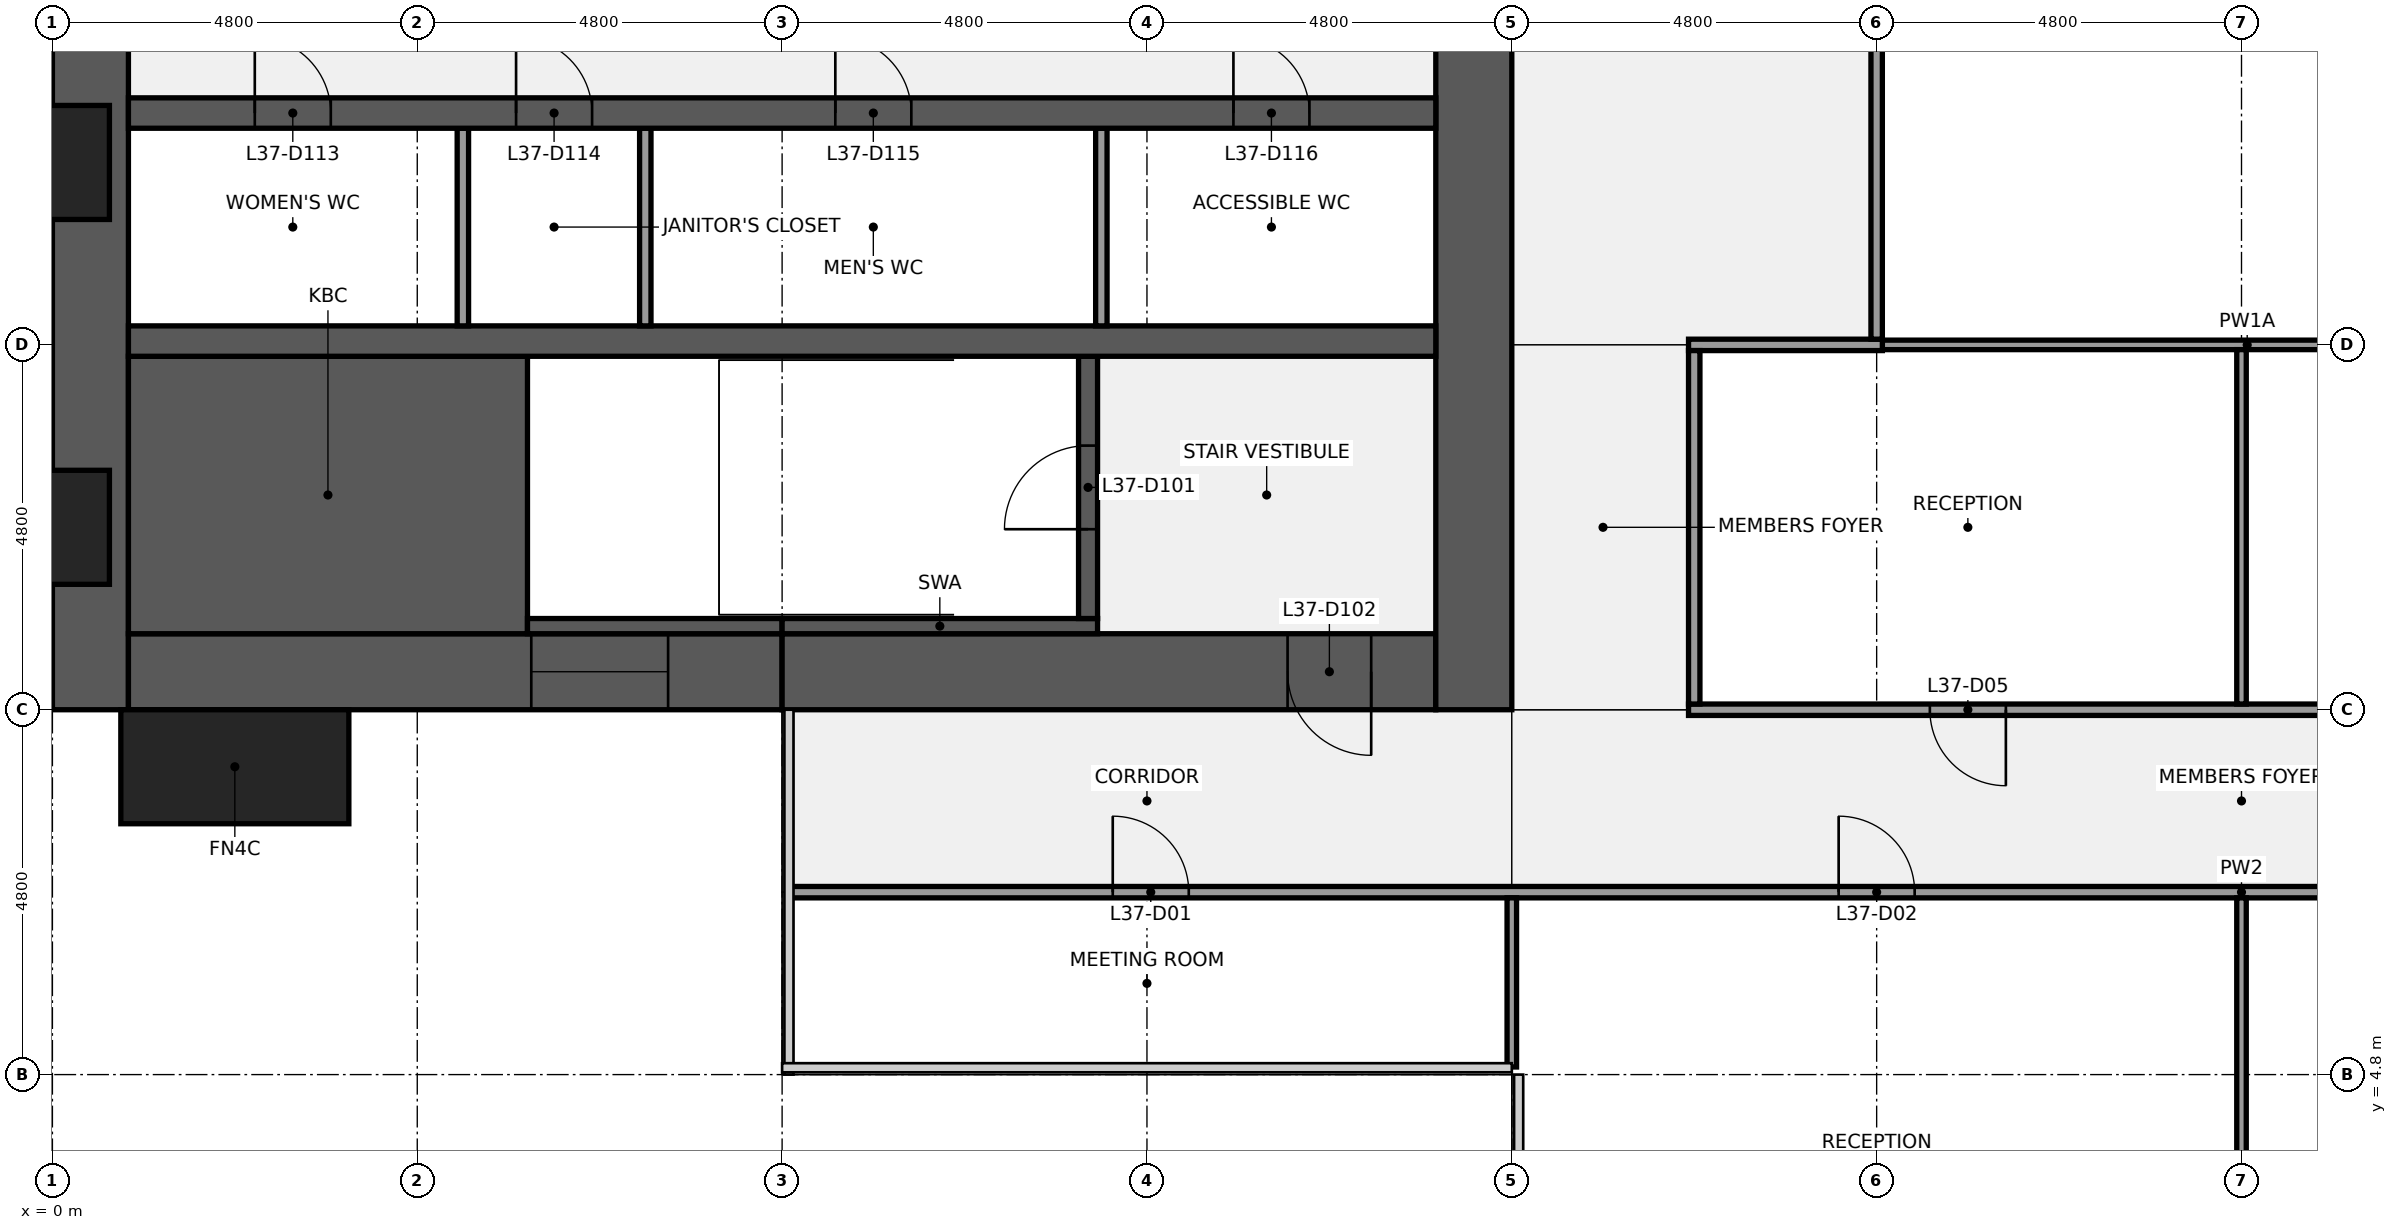
"""IFC4 building model, lengths in metres.
Left out: names, types, materials, properties, quantities, classifications, styles, units other than length and angle.
Written with IfcOpenShell. Run it as: python <this file> out.ifc"""

import sys

from ifc_helpers import new_model, si_unit, direction, frame, frame_2d, origin, origin_2d, place, context, subcontext, project, spatial, rectangle, extrude, element, fill, save


model = new_model("IFC4")
c1 = context("Model", 3, precision=1e-05, world=origin(), true_north=direction((0.0, 1.0)))
c2 = subcontext(c1, "Body", "Model", "MODEL_VIEW")
j1 = project(units=[si_unit("LENGTHUNIT", "METRE"), si_unit("PLANEANGLEUNIT", "RADIAN")], contexts=[c1])
p1 = place(None, origin())
s1 = spatial("IfcSite", under=j1, at=p1, CompositionType="ELEMENT")
p2 = place(p1, origin())
s2 = spatial("IfcBuilding", under=s1, at=p2, CompositionType="ELEMENT")
p3 = place(p2, frame((0.0, 0.0, 168.1)))
s3 = spatial("IfcBuildingStorey", under=s2, at=p3, CompositionType="ELEMENT", Elevation=168.1)
p4 = place(p3, frame((0.5, 9.6, 0.0), z_axis=(0.0, 0.0, 1.0), x_axis=(0.0, 1.0, 0.0)))
e1 = element("IfcWall", 1, at=p4, inside=s3, PredefinedType="SHEAR", context=c2, shape_type="SweptSolid", body=[
    extrude(rectangle(XDim=28.8, YDim=1.0, at=frame_2d((14.4, 0.0))), origin(), (0.0, 0.0, 1.0), 3.84),
])
p5 = place(p4, frame((8.85, 0.0, 0.9)))
e2 = element("IfcOpeningElement", 2, at=p5, cuts=e1, PredefinedType="OPENING", context=c2, shape_type="SweptSolid", body=[
    extrude(rectangle(XDim=1.5, YDim=1.5, at=frame_2d((0.75, 0.75))), frame((0.0, 0.51, 0.0), z_axis=(0.0, -1.0, 0.0), x_axis=(1.0, 0.0, 0.0)), (0.0, 0.0, 1.0), 1.02),
])
p6 = place(p4, frame((18.45, 0.0, 0.9)))
e3 = element("IfcOpeningElement", 3, at=p6, cuts=e1, PredefinedType="OPENING", context=c2, shape_type="SweptSolid", body=[
    extrude(rectangle(XDim=1.5, YDim=1.5, at=frame_2d((0.75, 0.75))), frame((0.0, 0.51, 0.0), z_axis=(0.0, -1.0, 0.0), x_axis=(1.0, 0.0, 0.0)), (0.0, 0.0, 1.0), 1.02),
])
p7 = place(p3, frame((9.6, 10.1, 0.0), z_axis=(0.0, 0.0, 1.0), x_axis=(-1.0, 0.0, 0.0)))
e4 = element("IfcWall", 4, at=p7, inside=s3, PredefinedType="SHEAR", context=c2, shape_type="SweptSolid", body=[
    extrude(rectangle(XDim=8.6, YDim=1.0, at=frame_2d((4.3, 0.0))), origin(), (0.0, 0.0, 1.0), 3.84),
])
p8 = place(p7, frame((1.5, 0.0, 0.9)))
e5 = element("IfcOpeningElement", 5, at=p8, cuts=e4, PredefinedType="OPENING", context=c2, shape_type="SweptSolid", body=[
    extrude(rectangle(XDim=1.8, YDim=1.5, at=frame_2d((0.9, 0.75))), frame((0.0, 0.51, 0.0), z_axis=(0.0, -1.0, 0.0), x_axis=(1.0, 0.0, 0.0)), (0.0, 0.0, 1.0), 1.02),
])
p9 = place(p3, frame((18.2, 10.1, 0.0), z_axis=(0.0, 0.0, 1.0), x_axis=(-1.0, 0.0, 0.0)))
e6 = element("IfcWall", 6, at=p9, inside=s3, PredefinedType="SHEAR", context=c2, shape_type="SweptSolid", body=[
    extrude(rectangle(XDim=8.6, YDim=1.0, at=frame_2d((4.3, 0.0))), origin(), (0.0, 0.0, 1.0), 3.84),
])
p10 = place(p9, frame((0.85, 0.0, 0.0)))
e7 = element("IfcOpeningElement", 7, at=p10, cuts=e6, PredefinedType="OPENING", context=c2, shape_type="SweptSolid", body=[
    extrude(rectangle(XDim=1.1, YDim=2.1, at=frame_2d((0.55, 1.05))), frame((0.0, 0.51, 0.0), z_axis=(0.0, -1.0, 0.0), x_axis=(1.0, 0.0, 0.0)), (0.0, 0.0, 1.0), 1.02),
])
p11 = place(p3, frame((18.7, 38.4, 0.0), z_axis=(0.0, 0.0, 1.0), x_axis=(0.0, -1.0, 0.0)))
e8 = element("IfcWall", 8, at=p11, inside=s3, PredefinedType="SHEAR", context=c2, shape_type="SweptSolid", body=[
    extrude(rectangle(XDim=28.8, YDim=1.0, at=frame_2d((14.4, 0.0))), origin(), (0.0, 0.0, 1.0), 3.84),
])
p12 = place(p11, frame((18.3, 0.0, 0.0)))
e9 = element("IfcOpeningElement", 9, at=p12, cuts=e8, PredefinedType="OPENING", context=c2, shape_type="SweptSolid", body=[
    extrude(rectangle(XDim=1.8, YDim=2.1, at=frame_2d((0.9, 1.05))), frame((0.0, 0.51, 0.0), z_axis=(0.0, -1.0, 0.0), x_axis=(1.0, 0.0, 0.0)), (0.0, 0.0, 1.0), 1.02),
])
p13 = place(p11, frame((8.7, 0.0, 0.0)))
e10 = element("IfcOpeningElement", 10, at=p13, cuts=e8, PredefinedType="OPENING", context=c2, shape_type="SweptSolid", body=[
    extrude(rectangle(XDim=1.8, YDim=2.1, at=frame_2d((0.9, 1.05))), frame((0.0, 0.51, 0.0), z_axis=(0.0, -1.0, 0.0), x_axis=(1.0, 0.0, 0.0)), (0.0, 0.0, 1.0), 1.02),
])
p14 = place(p3, frame((1.0, 12.425, 0.0), z_axis=(0.0, 0.0, 1.0), x_axis=(1.0, 0.0, 0.0)))
e11 = element("IfcWall", 11, at=p14, inside=s3, PredefinedType="SHEAR", context=c2, shape_type="SweptSolid", body=[
    extrude(rectangle(XDim=5.25, YDim=3.65, at=frame_2d((2.625, 0.0))), origin(), (0.0, 0.0, 1.0), 3.84),
])
p15 = place(p3, frame((6.25, 10.7, 0.0), z_axis=(0.0, 0.0, 1.0), x_axis=(1.0, 0.0, 0.0)))
e12 = element("IfcWall", 12, at=p15, inside=s3, PredefinedType="SHEAR", context=c2, shape_type="SweptSolid", body=[
    extrude(rectangle(XDim=3.35, YDim=0.2, at=frame_2d((1.675, 0.0))), origin(), (0.0, 0.0, 1.0), 3.84),
])
p16 = place(p3, frame((9.6, 10.7, 0.0), z_axis=(0.0, 0.0, 1.0), x_axis=(1.0, 0.0, 0.0)))
e13 = element("IfcWall", 13, at=p16, inside=s3, PredefinedType="SHEAR", context=c2, shape_type="SweptSolid", body=[
    extrude(rectangle(XDim=4.15, YDim=0.2, at=frame_2d((2.075, 0.0))), origin(), (0.0, 0.0, 1.0), 3.84),
])
p17 = place(p3, frame((13.625, 10.8, 0.0), z_axis=(0.0, 0.0, 1.0), x_axis=(0.0, 1.0, 0.0)))
e14 = element("IfcWall", 14, at=p17, inside=s3, PredefinedType="SHEAR", context=c2, shape_type="SweptSolid", body=[
    extrude(rectangle(XDim=3.45, YDim=0.25, at=frame_2d((1.725, 0.0))), origin(), (0.0, 0.0, 1.0), 3.84),
])
p18 = place(p17, frame((1.175, 0.0, 0.0)))
e15 = element("IfcOpeningElement", 15, at=p18, cuts=e14, PredefinedType="OPENING", context=c2, shape_type="SweptSolid", body=[
    extrude(rectangle(XDim=1.1, YDim=2.1, at=frame_2d((0.55, 1.05))), frame((0.0, 0.135, 0.0), z_axis=(0.0, -1.0, 0.0), x_axis=(1.0, 0.0, 0.0)), (0.0, 0.0, 1.0), 0.27),
])
p19 = place(p3, frame((1.0, 14.45, 0.0), z_axis=(0.0, 0.0, 1.0), x_axis=(1.0, 0.0, 0.0)))
e16 = element("IfcWall", 16, at=p19, inside=s3, PredefinedType="SHEAR", context=c2, shape_type="SweptSolid", body=[
    extrude(rectangle(XDim=17.2, YDim=0.4, at=frame_2d((8.6, 0.0))), origin(), (0.0, 0.0, 1.0), 3.84),
])
for number, where, z_axis, x_axis in (
    (17, (5.4, 14.65, 0.0), (0.0, 0.0, 1.0), (0.0, 1.0, 0.0)),
    (18, (7.8, 14.65, 0.0), (0.0, 0.0, 1.0), (0.0, 1.0, 0.0)),
    (19, (13.8, 14.65, 0.0), (0.0, 0.0, 1.0), (0.0, 1.0, 0.0)),
):
    element("IfcWall", number, at=place(p3, frame(where, z_axis=z_axis, x_axis=x_axis)), inside=s3, PredefinedType="PARTITIONING", context=c2, shape_type="SweptSolid", body=[
        extrude(rectangle(XDim=2.6, YDim=0.15, at=frame_2d((1.3, 0.0))), origin(), (0.0, 0.0, 1.0), 3.84),
    ])
p20 = place(p3, frame((1.0, 17.45, 0.0), z_axis=(0.0, 0.0, 1.0), x_axis=(1.0, 0.0, 0.0)))
e20 = element("IfcWall", 20, at=p20, inside=s3, PredefinedType="SHEAR", context=c2, shape_type="SweptSolid", body=[
    extrude(rectangle(XDim=17.2, YDim=0.4, at=frame_2d((8.6, 0.0))), origin(), (0.0, 0.0, 1.0), 3.84),
])
p21 = place(p20, frame((1.663, 0.0, 0.0)))
e21 = element("IfcOpeningElement", 21, at=p21, cuts=e20, PredefinedType="OPENING", context=c2, shape_type="SweptSolid", body=[
    extrude(rectangle(XDim=1.0, YDim=2.1, at=frame_2d((0.5, 1.05))), frame((0.0, 0.21, 0.0), z_axis=(0.0, -1.0, 0.0), x_axis=(1.0, 0.0, 0.0)), (0.0, 0.0, 1.0), 0.42),
])
p22 = place(p20, frame((5.1, 0.0, 0.0)))
e22 = element("IfcOpeningElement", 22, at=p22, cuts=e20, PredefinedType="OPENING", context=c2, shape_type="SweptSolid", body=[
    extrude(rectangle(XDim=1.0, YDim=2.1, at=frame_2d((0.5, 1.05))), frame((0.0, 0.21, 0.0), z_axis=(0.0, -1.0, 0.0), x_axis=(1.0, 0.0, 0.0)), (0.0, 0.0, 1.0), 0.42),
])
p23 = place(p20, frame((9.3, 0.0, 0.0)))
e23 = element("IfcOpeningElement", 23, at=p23, cuts=e20, PredefinedType="OPENING", context=c2, shape_type="SweptSolid", body=[
    extrude(rectangle(XDim=1.0, YDim=2.1, at=frame_2d((0.5, 1.05))), frame((0.0, 0.21, 0.0), z_axis=(0.0, -1.0, 0.0), x_axis=(1.0, 0.0, 0.0)), (0.0, 0.0, 1.0), 0.42),
])
p24 = place(p20, frame((14.538, 0.0, 0.0)))
e24 = element("IfcOpeningElement", 24, at=p24, cuts=e20, PredefinedType="OPENING", context=c2, shape_type="SweptSolid", body=[
    extrude(rectangle(XDim=1.0, YDim=2.1, at=frame_2d((0.5, 1.05))), frame((0.0, 0.21, 0.0), z_axis=(0.0, -1.0, 0.0), x_axis=(1.0, 0.0, 0.0)), (0.0, 0.0, 1.0), 0.42),
])
p25 = place(p3, frame((9.7, 7.2, 0.0), z_axis=(0.0, 0.0, 1.0), x_axis=(1.0, 0.0, 0.0)))
e25 = element("IfcWall", 25, at=p25, inside=s3, PredefinedType="PARTITIONING", context=c2, shape_type="SweptSolid", body=[
    extrude(rectangle(XDim=38.2, YDim=0.15, at=frame_2d((19.1, 0.0))), origin(), (0.0, 0.0, 1.0), 2.936),
])
p26 = place(p25, frame((4.25, 0.0, 0.0)))
e26 = element("IfcOpeningElement", 26, at=p26, cuts=e25, PredefinedType="OPENING", context=c2, shape_type="SweptSolid", body=[
    extrude(rectangle(XDim=1.0, YDim=2.1, at=frame_2d((0.5, 1.05))), frame((0.0, 0.085, 0.0), z_axis=(0.0, -1.0, 0.0), x_axis=(1.0, 0.0, 0.0)), (0.0, 0.0, 1.0), 0.17),
])
p27 = place(p25, frame((13.8, 0.0, 0.0)))
e27 = element("IfcOpeningElement", 27, at=p27, cuts=e25, PredefinedType="OPENING", context=c2, shape_type="SweptSolid", body=[
    extrude(rectangle(XDim=1.0, YDim=2.1, at=frame_2d((0.5, 1.05))), frame((0.0, 0.085, 0.0), z_axis=(0.0, -1.0, 0.0), x_axis=(1.0, 0.0, 0.0)), (0.0, 0.0, 1.0), 0.17),
])
p28 = place(p25, frame((23.4, 0.0, 0.0)))
e28 = element("IfcOpeningElement", 28, at=p28, cuts=e25, PredefinedType="OPENING", context=c2, shape_type="SweptSolid", body=[
    extrude(rectangle(XDim=1.0, YDim=2.1, at=frame_2d((0.5, 1.05))), frame((0.0, 0.085, 0.0), z_axis=(0.0, -1.0, 0.0), x_axis=(1.0, 0.0, 0.0)), (0.0, 0.0, 1.0), 0.17),
])
p29 = place(p25, frame((32.95, 0.0, 0.0)))
e29 = element("IfcOpeningElement", 29, at=p29, cuts=e25, PredefinedType="OPENING", context=c2, shape_type="SweptSolid", body=[
    extrude(rectangle(XDim=1.0, YDim=2.1, at=frame_2d((0.5, 1.05))), frame((0.0, 0.085, 0.0), z_axis=(0.0, -1.0, 0.0), x_axis=(1.0, 0.0, 0.0)), (0.0, 0.0, 1.0), 0.17),
])
p30 = place(p3, frame((21.525, 9.6, 0.0), z_axis=(0.0, 0.0, 1.0), x_axis=(1.0, 0.0, 0.0)))
e30 = element("IfcWall", 30, at=p30, inside=s3, PredefinedType="PARTITIONING", context=c2, shape_type="SweptSolid", body=[
    extrude(rectangle(XDim=14.55, YDim=0.15, at=frame_2d((7.275, 0.0))), origin(), (0.0, 0.0, 1.0), 2.936),
])
p31 = place(p30, frame((3.175, 0.0, 0.0)))
e31 = element("IfcOpeningElement", 31, at=p31, cuts=e30, PredefinedType="OPENING", context=c2, shape_type="SweptSolid", body=[
    extrude(rectangle(XDim=1.0, YDim=2.1, at=frame_2d((0.5, 1.05))), frame((0.0, 0.085, 0.0), z_axis=(0.0, -1.0, 0.0), x_axis=(1.0, 0.0, 0.0)), (0.0, 0.0, 1.0), 0.17),
])
p32 = place(p30, frame((10.375, 0.0, 0.0)))
e32 = element("IfcOpeningElement", 32, at=p32, cuts=e30, PredefinedType="OPENING", context=c2, shape_type="SweptSolid", body=[
    extrude(rectangle(XDim=1.0, YDim=2.1, at=frame_2d((0.5, 1.05))), frame((0.0, 0.085, 0.0), z_axis=(0.0, -1.0, 0.0), x_axis=(1.0, 0.0, 0.0)), (0.0, 0.0, 1.0), 0.17),
])
p33 = place(p3, frame((24.075, 14.4, 0.0), z_axis=(0.0, 0.0, 1.0), x_axis=(1.0, 0.0, 0.0)))
e33 = element("IfcWall", 33, at=p33, inside=s3, PredefinedType="PARTITIONING", context=c2, shape_type="SweptSolid", body=[
    extrude(rectangle(XDim=9.6, YDim=0.125, at=frame_2d((4.8, 0.0))), origin(), (0.0, 0.0, 1.0), 2.936),
])
p34 = place(p3, frame((21.525, 14.4, 0.0), z_axis=(0.0, 0.0, 1.0), x_axis=(1.0, 0.0, 0.0)))
e34 = element("IfcWall", 34, at=p34, inside=s3, PredefinedType="PARTITIONING", context=c2, shape_type="SweptSolid", body=[
    extrude(rectangle(XDim=2.55, YDim=0.15, at=frame_2d((1.275, 0.0))), origin(), (0.0, 0.0, 1.0), 2.936),
])
p35 = place(p3, frame((19.2, 4.9, 0.0), z_axis=(0.0, 0.0, 1.0), x_axis=(0.0, 1.0, 0.0)))
e35 = element("IfcWall", 35, at=p35, inside=s3, PredefinedType="PARTITIONING", context=c2, shape_type="SweptSolid", body=[
    extrude(rectangle(XDim=2.225, YDim=0.125, at=frame_2d((1.113, 0.0))), origin(), (0.0, 0.0, 1.0), 2.936),
])
p36 = place(p3, frame((21.6, 9.675, 0.0), z_axis=(0.0, 0.0, 1.0), x_axis=(0.0, 1.0, 0.0)))
e36 = element("IfcWall", 36, at=p36, inside=s3, PredefinedType="PARTITIONING", context=c2, shape_type="SweptSolid", body=[
    extrude(rectangle(XDim=4.65, YDim=0.15, at=frame_2d((2.325, 0.0))), origin(), (0.0, 0.0, 1.0), 2.936),
])
p37 = place(p3, frame((24.0, 14.475, 0.0), z_axis=(0.0, 0.0, 1.0), x_axis=(0.0, 1.0, 0.0)))
e37 = element("IfcWall", 37, at=p37, inside=s3, PredefinedType="PARTITIONING", context=c2, shape_type="SweptSolid", body=[
    extrude(rectangle(XDim=13.05, YDim=0.15, at=frame_2d((6.525, 0.0))), origin(), (0.0, 0.0, 1.0), 2.936),
])
p38 = place(p37, frame((6.025, 0.0, 0.0)))
e38 = element("IfcOpeningElement", 38, at=p38, cuts=e37, PredefinedType="OPENING", context=c2, shape_type="SweptSolid", body=[
    extrude(rectangle(XDim=1.0, YDim=2.1, at=frame_2d((0.5, 1.05))), frame((0.0, 0.085, 0.0), z_axis=(0.0, -1.0, 0.0), x_axis=(1.0, 0.0, 0.0)), (0.0, 0.0, 1.0), 0.17),
])
p39 = place(p3, frame((28.8, 0.6, 0.0), z_axis=(0.0, 0.0, 1.0), x_axis=(0.0, 1.0, 0.0)))
e39 = element("IfcWall", 39, at=p39, inside=s3, PredefinedType="PARTITIONING", context=c2, shape_type="SweptSolid", body=[
    extrude(rectangle(XDim=6.525, YDim=0.125, at=frame_2d((3.262, 0.0))), origin(), (0.0, 0.0, 1.0), 2.936),
])
p40 = place(p3, frame((28.8, 9.675, 0.0), z_axis=(0.0, 0.0, 1.0), x_axis=(0.0, 1.0, 0.0)))
e40 = element("IfcWall", 40, at=p40, inside=s3, PredefinedType="PARTITIONING", context=c2, shape_type="SweptSolid", body=[
    extrude(rectangle(XDim=4.662, YDim=0.125, at=frame_2d((2.331, 0.0))), origin(), (0.0, 0.0, 1.0), 2.936),
])
p41 = place(p3, frame((2.4, 8.85, 0.0), z_axis=(0.0, 0.0, 1.0), x_axis=(1.0, 0.0, 0.0)))
e41 = element("IfcColumn", 41, at=p41, inside=s3, PredefinedType="PILASTER", context=c2, shape_type="SweptSolid", body=[
    extrude(rectangle(XDim=3.0, YDim=1.5, at=origin_2d()), origin(), (0.0, 0.0, 1.0), 4.0),
])
p42 = place(p18, origin())
e42 = element("IfcDoor", 42, at=p42, inside=s3, OperationType="SINGLE_SWING_LEFT", PredefinedType="DOOR", context=c2, shape_type="SweptSolid", body=[
    extrude(rectangle(XDim=1.1, YDim=2.1, at=frame_2d((0.55, 1.05))), frame((0.0, 0.025, 0.0), z_axis=(0.0, -1.0, 0.0), x_axis=(1.0, 0.0, 0.0)), (0.0, 0.0, 1.0), 0.05),
])
fill(e15, e42)
p43 = place(p10, origin())
e43 = element("IfcDoor", 43, at=p43, inside=s3, OperationType="SINGLE_SWING_LEFT", PredefinedType="DOOR", context=c2, shape_type="SweptSolid", body=[
    extrude(rectangle(XDim=1.1, YDim=2.1, at=frame_2d((0.55, 1.05))), frame((0.0, 0.025, 0.0), z_axis=(0.0, -1.0, 0.0), x_axis=(1.0, 0.0, 0.0)), (0.0, 0.0, 1.0), 0.05),
])
fill(e7, e43)
p44 = place(p21, origin())
e44 = element("IfcDoor", 44, at=p44, inside=s3, OperationType="SINGLE_SWING_LEFT", PredefinedType="DOOR", context=c2, shape_type="SweptSolid", body=[
    extrude(rectangle(XDim=1.0, YDim=2.1, at=frame_2d((0.5, 1.05))), frame((0.0, 0.025, 0.0), z_axis=(0.0, -1.0, 0.0), x_axis=(1.0, 0.0, 0.0)), (0.0, 0.0, 1.0), 0.05),
])
fill(e21, e44)
p45 = place(p22, origin())
e45 = element("IfcDoor", 45, at=p45, inside=s3, OperationType="SINGLE_SWING_LEFT", PredefinedType="DOOR", context=c2, shape_type="SweptSolid", body=[
    extrude(rectangle(XDim=1.0, YDim=2.1, at=frame_2d((0.5, 1.05))), frame((0.0, 0.025, 0.0), z_axis=(0.0, -1.0, 0.0), x_axis=(1.0, 0.0, 0.0)), (0.0, 0.0, 1.0), 0.05),
])
fill(e22, e45)
p46 = place(p23, origin())
e46 = element("IfcDoor", 46, at=p46, inside=s3, OperationType="SINGLE_SWING_LEFT", PredefinedType="DOOR", context=c2, shape_type="SweptSolid", body=[
    extrude(rectangle(XDim=1.0, YDim=2.1, at=frame_2d((0.5, 1.05))), frame((0.0, 0.025, 0.0), z_axis=(0.0, -1.0, 0.0), x_axis=(1.0, 0.0, 0.0)), (0.0, 0.0, 1.0), 0.05),
])
fill(e23, e46)
p47 = place(p24, origin())
e47 = element("IfcDoor", 47, at=p47, inside=s3, OperationType="SINGLE_SWING_LEFT", PredefinedType="DOOR", context=c2, shape_type="SweptSolid", body=[
    extrude(rectangle(XDim=1.0, YDim=2.1, at=frame_2d((0.5, 1.05))), frame((0.0, 0.025, 0.0), z_axis=(0.0, -1.0, 0.0), x_axis=(1.0, 0.0, 0.0)), (0.0, 0.0, 1.0), 0.05),
])
fill(e24, e47)
p48 = place(p8, origin())
e48 = element("IfcWindow", 48, at=p48, inside=s3, PartitioningType="SINGLE_PANEL", PredefinedType="WINDOW", context=c2, shape_type="SweptSolid", body=[
    extrude(rectangle(XDim=1.8, YDim=1.5, at=frame_2d((0.9, 0.75))), frame((0.0, 0.03, 0.0), z_axis=(0.0, -1.0, 0.0), x_axis=(1.0, 0.0, 0.0)), (0.0, 0.0, 1.0), 0.06),
])
fill(e5, e48)
p49 = place(p26, origin())
e49 = element("IfcDoor", 49, at=p49, inside=s3, OperationType="SINGLE_SWING_LEFT", PredefinedType="DOOR", context=c2, shape_type="SweptSolid", body=[
    extrude(rectangle(XDim=1.0, YDim=2.1, at=frame_2d((0.5, 1.05))), frame((0.0, 0.025, 0.0), z_axis=(0.0, -1.0, 0.0), x_axis=(1.0, 0.0, 0.0)), (0.0, 0.0, 1.0), 0.05),
])
fill(e26, e49)
p50 = place(p27, origin())
e50 = element("IfcDoor", 50, at=p50, inside=s3, OperationType="SINGLE_SWING_LEFT", PredefinedType="DOOR", context=c2, shape_type="SweptSolid", body=[
    extrude(rectangle(XDim=1.0, YDim=2.1, at=frame_2d((0.5, 1.05))), frame((0.0, 0.025, 0.0), z_axis=(0.0, -1.0, 0.0), x_axis=(1.0, 0.0, 0.0)), (0.0, 0.0, 1.0), 0.05),
])
fill(e27, e50)
p51 = place(p31, origin())
e51 = element("IfcDoor", 51, at=p51, inside=s3, OperationType="SINGLE_SWING_RIGHT", PredefinedType="DOOR", context=c2, shape_type="SweptSolid", body=[
    extrude(rectangle(XDim=1.0, YDim=2.1, at=frame_2d((0.5, 1.05))), frame((0.0, 0.025, 0.0), z_axis=(0.0, -1.0, 0.0), x_axis=(1.0, 0.0, 0.0)), (0.0, 0.0, 1.0), 0.05),
])
fill(e31, e51)
save(model, sys.argv[1])
